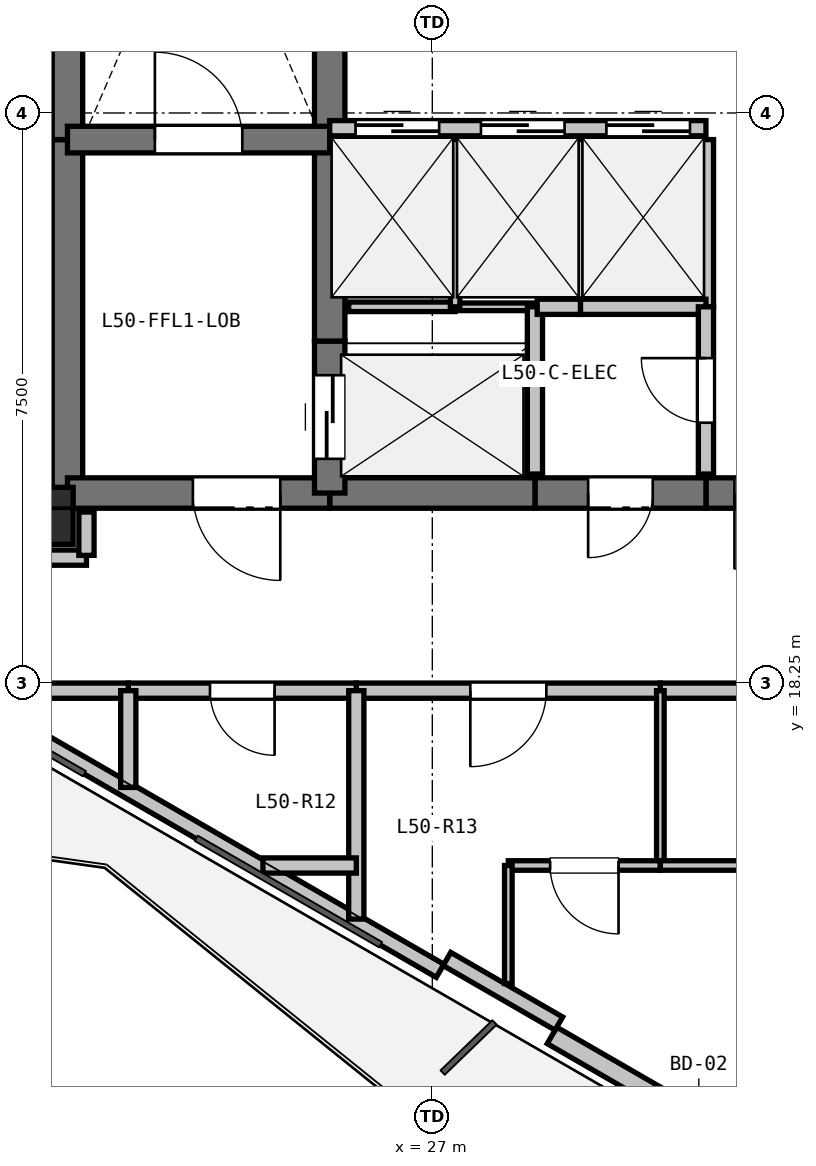
"""IFC4 building model, lengths in metres.
Left out: names, types, materials, properties, quantities, classifications, styles, units other than length and angle.
Written with IfcOpenShell. Run it as: python <this file> out.ifc"""

import sys

from ifc_helpers import new_model, si_unit, direction, frame, frame_2d, origin, origin_2d, place, context, subcontext, project, spatial, rectangle, extrude, element, fill, save


model = new_model("IFC4")
c1 = context("Model", 3, precision=1e-05, world=origin(), true_north=direction((0.0, 1.0)))
c2 = subcontext(c1, "Body", "Model", "MODEL_VIEW")
j1 = project(units=[si_unit("LENGTHUNIT", "METRE"), si_unit("PLANEANGLEUNIT", "RADIAN")], contexts=[c1])
p1 = place(None, origin())
s1 = spatial("IfcSite", under=j1, at=p1, CompositionType="ELEMENT")
p2 = place(p1, origin())
s2 = spatial("IfcBuilding", under=s1, at=p2, CompositionType="ELEMENT")
p3 = place(p2, frame((0.0, 0.0, 182.1)))
s3 = spatial("IfcBuildingStorey", under=s2, at=p3, CompositionType="ELEMENT", Elevation=182.1)
p4 = place(p3, frame((21.9, 20.45, 0.0), z_axis=(0.0, 0.0, 1.0), x_axis=(1.0, 0.0, 0.0)))
e1 = element("IfcColumn", 1, at=p4, inside=s3, PredefinedType="COLUMN", context=c2, shape_type="SweptSolid", body=[
    extrude(rectangle(XDim=0.75, YDim=0.75, at=origin_2d()), origin(), (0.0, 0.0, 1.0), 3.3),
])
p5 = place(p3, frame((36.974, 8.765, 0.0), z_axis=(0.0, 0.0, 1.0), x_axis=(-0.866016233231, 0.500015883528, 0.0)))
e2 = element("IfcWall", 2, at=p5, inside=s3, PredefinedType="SOLIDWALL", context=c2, shape_type="SweptSolid", body=[
    extrude(rectangle(XDim=9.699, YDim=0.25, at=frame_2d((4.85, 0.0))), origin(), (0.0, 0.0, 1.0), 2.69),
])
p6 = place(p5, frame((6.919, 0.0, 0.0)))
e3 = element("IfcOpeningElement", 3, at=p6, cuts=e2, PredefinedType="OPENING", context=c2, shape_type="SweptSolid", body=[
    extrude(rectangle(XDim=1.1, YDim=2.1, at=frame_2d((0.55, 1.05))), frame((0.0, 0.135, 0.0), z_axis=(0.0, -1.0, 0.0), x_axis=(1.0, 0.0, 0.0)), (0.0, 0.0, 1.0), 0.27),
])
p7 = place(p3, frame((27.102, 14.464, 0.0), z_axis=(0.0, 0.0, 1.0), x_axis=(-0.866020680503, 0.500008180874, 0.0)))
e4 = element("IfcWall", 4, at=p7, inside=s3, PredefinedType="PARAPET", context=c2, shape_type="SweptSolid", body=[
    extrude(rectangle(XDim=8.999, YDim=0.2, at=frame_2d((4.5, 0.0))), origin(), (0.0, 0.0, 1.0), 0.2),
])
p8 = place(p3, frame((28.665, 13.77, 0.0), z_axis=(0.0, 0.0, 1.0), x_axis=(-0.866025371046, 0.500000056704, 0.0)))
e5 = element("IfcWall", 5, at=p8, inside=s3, PredefinedType="PARAPET", context=c2, shape_type="SweptSolid", body=[
    extrude(rectangle(XDim=1.7, YDim=0.2, at=frame_2d((0.85, 0.0))), origin(), (0.0, 0.0, 1.0), 2.69),
])
p9 = place(p3, frame((22.2, 20.75, 0.0), z_axis=(0.0, 0.0, 1.0), x_axis=(0.0, 1.0, 0.0)))
e6 = element("IfcWall", 6, at=p9, inside=s3, PredefinedType="SHEAR", context=c2, shape_type="SweptSolid", body=[
    extrude(rectangle(XDim=4.65, YDim=0.4, at=frame_2d((2.325, 0.0))), origin(), (0.0, 0.0, 1.0), 3.07),
])
p10 = place(p3, frame((22.2, 25.4, 0.0), z_axis=(0.0, 0.0, 1.0), x_axis=(0.0, 1.0, 0.0)))
e7 = element("IfcWall", 7, at=p10, inside=s3, PredefinedType="SHEAR", context=c2, shape_type="SweptSolid", body=[
    extrude(rectangle(XDim=7.35, YDim=0.4, at=frame_2d((3.675, 0.0))), origin(), (0.0, 0.0, 1.0), 3.07),
])
p11 = place(p3, frame((32.35, 20.75, 0.0), z_axis=(0.0, 0.0, 1.0), x_axis=(-1.0, 0.0, 0.0)))
e8 = element("IfcWall", 8, at=p11, inside=s3, PredefinedType="SHEAR", context=c2, shape_type="SweptSolid", body=[
    extrude(rectangle(XDim=1.75, YDim=0.4, at=frame_2d((0.875, 0.0))), origin(), (0.0, 0.0, 1.0), 3.07),
])
p12 = place(p11, frame((0.375, 0.0, 0.0)))
e9 = element("IfcOpeningElement", 9, at=p12, cuts=e8, PredefinedType="OPENING", context=c2, shape_type="SweptSolid", body=[
    extrude(rectangle(XDim=1.0, YDim=2.15, at=frame_2d((0.5, 1.075))), frame((0.0, 0.21, 0.0), z_axis=(0.0, -1.0, 0.0), x_axis=(1.0, 0.0, 0.0)), (0.0, 0.0, 1.0), 0.42),
])
p13 = place(p3, frame((30.6, 20.75, 0.0), z_axis=(0.0, 0.0, 1.0), x_axis=(-1.0, 0.0, 0.0)))
e10 = element("IfcWall", 10, at=p13, inside=s3, PredefinedType="SHEAR", context=c2, shape_type="SweptSolid", body=[
    extrude(rectangle(XDim=2.25, YDim=0.4, at=frame_2d((1.125, 0.0))), origin(), (0.0, 0.0, 1.0), 3.07),
])
p14 = place(p13, frame((0.7, 0.0, 0.0)))
e11 = element("IfcOpeningElement", 11, at=p14, cuts=e10, PredefinedType="OPENING", context=c2, shape_type="SweptSolid", body=[
    extrude(rectangle(XDim=0.85, YDim=2.1, at=frame_2d((0.425, 1.05))), frame((0.0, 0.21, 0.0), z_axis=(0.0, -1.0, 0.0), x_axis=(1.0, 0.0, 0.0)), (0.0, 0.0, 1.0), 0.42),
])
p15 = place(p3, frame((28.35, 20.75, 0.0), z_axis=(0.0, 0.0, 1.0), x_axis=(-1.0, 0.0, 0.0)))
e12 = element("IfcWall", 12, at=p15, inside=s3, PredefinedType="SHEAR", context=c2, shape_type="SweptSolid", body=[
    extrude(rectangle(XDim=2.7, YDim=0.4, at=frame_2d((1.35, 0.0))), origin(), (0.0, 0.0, 1.0), 3.07),
])
p16 = place(p3, frame((25.65, 20.75, 0.0), z_axis=(0.0, 0.0, 1.0), x_axis=(-1.0, 0.0, 0.0)))
e13 = element("IfcWall", 13, at=p16, inside=s3, PredefinedType="SHEAR", context=c2, shape_type="SweptSolid", body=[
    extrude(rectangle(XDim=3.45, YDim=0.4, at=frame_2d((1.725, 0.0))), origin(), (0.0, 0.0, 1.0), 3.07),
])
p17 = place(p16, frame((0.65, 0.0, 0.0)))
e14 = element("IfcOpeningElement", 14, at=p17, cuts=e13, PredefinedType="OPENING", context=c2, shape_type="SweptSolid", body=[
    extrude(rectangle(XDim=1.15, YDim=2.15, at=frame_2d((0.575, 1.075))), frame((0.0, 0.21, 0.0), z_axis=(0.0, -1.0, 0.0), x_axis=(1.0, 0.0, 0.0)), (0.0, 0.0, 1.0), 0.42),
])
p18 = place(p3, frame((25.65, 20.75, 0.0), z_axis=(0.0, 0.0, 1.0), x_axis=(0.0, 1.0, 0.0)))
e15 = element("IfcWall", 15, at=p18, inside=s3, PredefinedType="SHEAR", context=c2, shape_type="SweptSolid", body=[
    extrude(rectangle(XDim=2.0, YDim=0.4, at=frame_2d((1.0, 0.0))), origin(), (0.0, 0.0, 1.0), 3.07),
])
p19 = place(p18, frame((0.45, 0.0, 0.0)))
e16 = element("IfcOpeningElement", 16, at=p19, cuts=e15, PredefinedType="OPENING", context=c2, shape_type="SweptSolid", body=[
    extrude(rectangle(XDim=1.1, YDim=2.15, at=frame_2d((0.55, 1.075))), frame((0.0, 0.21, 0.0), z_axis=(0.0, -1.0, 0.0), x_axis=(1.0, 0.0, 0.0)), (0.0, 0.0, 1.0), 0.42),
])
p20 = place(p3, frame((25.65, 22.75, 0.0), z_axis=(0.0, 0.0, 1.0), x_axis=(0.0, 1.0, 0.0)))
e17 = element("IfcWall", 17, at=p20, inside=s3, PredefinedType="SHEAR", context=c2, shape_type="SweptSolid", body=[
    extrude(rectangle(XDim=2.8, YDim=0.4, at=frame_2d((1.4, 0.0))), origin(), (0.0, 0.0, 1.0), 3.07),
])
p21 = place(p3, frame((25.65, 25.55, 0.0), z_axis=(0.0, 0.0, 1.0), x_axis=(0.0, 1.0, 0.0)))
e18 = element("IfcWall", 18, at=p21, inside=s3, PredefinedType="SHEAR", context=c2, shape_type="SweptSolid", body=[
    extrude(rectangle(XDim=2.4, YDim=0.4, at=frame_2d((1.2, 0.0))), origin(), (0.0, 0.0, 1.0), 3.07),
])
p22 = place(p3, frame((22.2, 25.4, 0.0), z_axis=(0.0, 0.0, 1.0), x_axis=(1.0, 0.0, 0.0)))
e19 = element("IfcWall", 19, at=p22, inside=s3, PredefinedType="SHEAR", context=c2, shape_type="SweptSolid", body=[
    extrude(rectangle(XDim=3.45, YDim=0.35, at=frame_2d((1.725, 0.0))), origin(), (0.0, 0.0, 1.0), 3.07),
])
p23 = place(p22, frame((1.15, 0.0, 0.0)))
e20 = element("IfcOpeningElement", 20, at=p23, cuts=e19, PredefinedType="OPENING", context=c2, shape_type="SweptSolid", body=[
    extrude(rectangle(XDim=1.15, YDim=2.15, at=frame_2d((0.575, 1.075))), frame((0.0, 0.185, 0.0), z_axis=(0.0, -1.0, 0.0), x_axis=(1.0, 0.0, 0.0)), (0.0, 0.0, 1.0), 0.37),
])
p24 = place(p3, frame((25.65, 25.55, 0.0), z_axis=(0.0, 0.0, 1.0), x_axis=(1.0, 0.0, 0.0)))
e21 = element("IfcWall", 21, at=p24, inside=s3, PredefinedType="PARTITIONING", context=c2, shape_type="SweptSolid", body=[
    extrude(rectangle(XDim=4.95, YDim=0.2, at=frame_2d((2.475, 0.0))), origin(), (0.0, 0.0, 1.0), 3.07),
])
p25 = place(p24, frame((0.34, 0.0, 0.0)))
e22 = element("IfcOpeningElement", 22, at=p25, cuts=e21, PredefinedType="OPENING", context=c2, shape_type="SweptSolid", body=[
    extrude(rectangle(XDim=1.1, YDim=2.15, at=frame_2d((0.55, 1.075))), frame((0.0, 0.11, 0.0), z_axis=(0.0, -1.0, 0.0), x_axis=(1.0, 0.0, 0.0)), (0.0, 0.0, 1.0), 0.22),
])
p26 = place(p24, frame((1.99, 0.0, 0.0)))
e23 = element("IfcOpeningElement", 23, at=p26, cuts=e21, PredefinedType="OPENING", context=c2, shape_type="SweptSolid", body=[
    extrude(rectangle(XDim=1.1, YDim=2.15, at=frame_2d((0.55, 1.075))), frame((0.0, 0.11, 0.0), z_axis=(0.0, -1.0, 0.0), x_axis=(1.0, 0.0, 0.0)), (0.0, 0.0, 1.0), 0.22),
])
p27 = place(p24, frame((3.64, 0.0, 0.0)))
e24 = element("IfcOpeningElement", 24, at=p27, cuts=e21, PredefinedType="OPENING", context=c2, shape_type="SweptSolid", body=[
    extrude(rectangle(XDim=1.1, YDim=2.15, at=frame_2d((0.55, 1.075))), frame((0.0, 0.11, 0.0), z_axis=(0.0, -1.0, 0.0), x_axis=(1.0, 0.0, 0.0)), (0.0, 0.0, 1.0), 0.22),
])
p28 = place(p3, frame((25.9, 23.2, 0.0), z_axis=(0.0, 0.0, 1.0), x_axis=(1.0, 0.0, 0.0)))
e25 = element("IfcWall", 25, at=p28, inside=s3, PredefinedType="PARTITIONING", context=c2, shape_type="SweptSolid", body=[
    extrude(rectangle(XDim=1.4, YDim=0.125, at=frame_2d((0.7, 0.0))), origin(), (0.0, 0.0, 1.0), 3.07),
])
p29 = place(p3, frame((27.3, 23.2, 0.0), z_axis=(0.0, 0.0, 1.0), x_axis=(1.0, 0.0, 0.0)))
e26 = element("IfcWall", 26, at=p29, inside=s3, PredefinedType="PARTITIONING", context=c2, shape_type="SweptSolid", body=[
    extrude(rectangle(XDim=1.05, YDim=0.1, at=frame_2d((0.525, 0.0))), origin(), (0.0, 0.0, 1.0), 3.07),
])
p30 = place(p3, frame((28.35, 23.2, 0.0), z_axis=(0.0, 0.0, 1.0), x_axis=(0.0, -1.0, 0.0)))
e27 = element("IfcWall", 27, at=p30, inside=s3, PredefinedType="PARTITIONING", context=c2, shape_type="SweptSolid", body=[
    extrude(rectangle(XDim=2.2, YDim=0.2, at=frame_2d((1.1, 0.0))), origin(), (0.0, 0.0, 1.0), 3.07),
])
p31 = place(p3, frame((27.3, 25.4, 0.0), z_axis=(0.0, 0.0, 1.0), x_axis=(0.0, -1.0, 0.0)))
e28 = element("IfcWall", 28, at=p31, inside=s3, PredefinedType="PARTITIONING", context=c2, shape_type="SweptSolid", body=[
    extrude(rectangle(XDim=2.2, YDim=0.125, at=frame_2d((1.1, 0.0))), origin(), (0.0, 0.0, 1.0), 3.07),
])
p32 = place(p3, frame((28.95, 25.4, 0.0), z_axis=(0.0, 0.0, 1.0), x_axis=(0.0, -1.0, 0.0)))
e29 = element("IfcWall", 29, at=p32, inside=s3, PredefinedType="PARTITIONING", context=c2, shape_type="SweptSolid", body=[
    extrude(rectangle(XDim=2.2, YDim=0.1, at=frame_2d((1.1, 0.0))), origin(), (0.0, 0.0, 1.0), 3.07),
])
p33 = place(p3, frame((28.95, 23.2, 0.0), z_axis=(0.0, 0.0, 1.0), x_axis=(-1.0, 0.0, 0.0)))
e30 = element("IfcWall", 30, at=p33, inside=s3, PredefinedType="PARTITIONING", context=c2, shape_type="SweptSolid", body=[
    extrude(rectangle(XDim=0.57, YDim=0.2, at=frame_2d((0.285, 0.0))), origin(), (0.0, 0.0, 1.0), 3.07),
])
p34 = place(p3, frame((30.6, 25.4, 0.0), z_axis=(0.0, 0.0, 1.0), x_axis=(0.0, -1.0, 0.0)))
e31 = element("IfcWall", 31, at=p34, inside=s3, PredefinedType="PARTITIONING", context=c2, shape_type="SweptSolid", body=[
    extrude(rectangle(XDim=2.2, YDim=0.2, at=frame_2d((1.1, 0.0))), origin(), (0.0, 0.0, 1.0), 3.07),
])
p35 = place(p3, frame((30.6, 23.2, 0.0), z_axis=(0.0, 0.0, 1.0), x_axis=(-1.0, 0.0, 0.0)))
e32 = element("IfcWall", 32, at=p35, inside=s3, PredefinedType="PARTITIONING", context=c2, shape_type="SweptSolid", body=[
    extrude(rectangle(XDim=1.65, YDim=0.2, at=frame_2d((0.825, 0.0))), origin(), (0.0, 0.0, 1.0), 3.07),
])
p36 = place(p3, frame((30.6, 21.0, 0.0), z_axis=(0.0, 0.0, 1.0), x_axis=(0.0, 1.0, 0.0)))
e33 = element("IfcWall", 33, at=p36, inside=s3, PredefinedType="PARTITIONING", context=c2, shape_type="SweptSolid", body=[
    extrude(rectangle(XDim=2.2, YDim=0.2, at=frame_2d((1.1, 0.0))), origin(), (0.0, 0.0, 1.0), 3.07),
])
p37 = place(p36, frame((0.675, 0.0, 0.0)))
e34 = element("IfcOpeningElement", 34, at=p37, cuts=e33, PredefinedType="OPENING", context=c2, shape_type="SweptSolid", body=[
    extrude(rectangle(XDim=0.85, YDim=2.1, at=frame_2d((0.425, 1.05))), frame((0.0, 0.11, 0.0), z_axis=(0.0, -1.0, 0.0), x_axis=(1.0, 0.0, 0.0)), (0.0, 0.0, 1.0), 0.22),
])
p38 = place(p3, frame((21.35, 19.9, 0.0), z_axis=(0.0, 0.0, 1.0), x_axis=(1.0, 0.0, 0.0)))
e35 = element("IfcWall", 35, at=p38, inside=s3, PredefinedType="PARTITIONING", context=c2, shape_type="SweptSolid", body=[
    extrude(rectangle(XDim=1.1, YDim=0.2, at=frame_2d((0.55, 0.0))), origin(), (0.0, 0.0, 1.0), 2.518),
])
p39 = place(p3, frame((22.45, 19.93, 0.0), z_axis=(0.0, 0.0, 1.0), x_axis=(0.0, 1.0, 0.0)))
e36 = element("IfcWall", 36, at=p39, inside=s3, PredefinedType="PARTITIONING", context=c2, shape_type="SweptSolid", body=[
    extrude(rectangle(XDim=0.57, YDim=0.2, at=frame_2d((0.285, 0.0))), origin(), (0.0, 0.0, 1.0), 2.518),
])
p40 = place(p3, frame((34.0, 18.15, 0.0), z_axis=(0.0, 0.0, 1.0), x_axis=(-1.0, 0.0, 0.0)))
e37 = element("IfcWall", 37, at=p40, inside=s3, PredefinedType="PARTITIONING", context=c2, shape_type="SweptSolid", body=[
    extrude(rectangle(XDim=4.0, YDim=0.2, at=frame_2d((2.0, 0.0))), origin(), (0.0, 0.0, 1.0), 3.07),
])
p41 = place(p3, frame((30.0, 18.15, 0.0), z_axis=(0.0, 0.0, 1.0), x_axis=(-1.0, 0.0, 0.0)))
e38 = element("IfcWall", 38, at=p41, inside=s3, PredefinedType="PARTITIONING", context=c2, shape_type="SweptSolid", body=[
    extrude(rectangle(XDim=4.0, YDim=0.2, at=frame_2d((2.0, 0.0))), origin(), (0.0, 0.0, 1.0), 3.07),
])
p42 = place(p41, frame((1.5, 0.0, 0.0)))
e39 = element("IfcOpeningElement", 39, at=p42, cuts=e38, PredefinedType="OPENING", context=c2, shape_type="SweptSolid", body=[
    extrude(rectangle(XDim=1.0, YDim=2.15, at=frame_2d((0.5, 1.075))), frame((0.0, 0.11, 0.0), z_axis=(0.0, -1.0, 0.0), x_axis=(1.0, 0.0, 0.0)), (0.0, 0.0, 1.0), 0.22),
])
p43 = place(p3, frame((26.0, 18.15, 0.0), z_axis=(0.0, 0.0, 1.0), x_axis=(-1.0, 0.0, 0.0)))
e40 = element("IfcWall", 40, at=p43, inside=s3, PredefinedType="PARTITIONING", context=c2, shape_type="SweptSolid", body=[
    extrude(rectangle(XDim=3.0, YDim=0.2, at=frame_2d((1.5, 0.0))), origin(), (0.0, 0.0, 1.0), 2.518),
])
p44 = place(p43, frame((1.075, 0.0, 0.0)))
e41 = element("IfcOpeningElement", 41, at=p44, cuts=e40, PredefinedType="OPENING", context=c2, shape_type="SweptSolid", body=[
    extrude(rectangle(XDim=0.85, YDim=2.1, at=frame_2d((0.425, 1.05))), frame((0.0, 0.11, 0.0), z_axis=(0.0, -1.0, 0.0), x_axis=(1.0, 0.0, 0.0)), (0.0, 0.0, 1.0), 0.22),
])
p45 = place(p3, frame((23.0, 18.15, 0.0), z_axis=(0.0, 0.0, 1.0), x_axis=(-1.0, 0.0, 0.0)))
e42 = element("IfcWall", 42, at=p45, inside=s3, PredefinedType="PARTITIONING", context=c2, shape_type="SweptSolid", body=[
    extrude(rectangle(XDim=2.212, YDim=0.2, at=frame_2d((1.106, 0.0))), origin(), (0.0, 0.0, 1.0), 2.365),
])
p46 = place(p3, frame((26.0, 18.15, 0.0), z_axis=(0.0, 0.0, 1.0), x_axis=(0.0, -1.0, 0.0)))
e43 = element("IfcWall", 43, at=p46, inside=s3, PredefinedType="PARTITIONING", context=c2, shape_type="SweptSolid", body=[
    extrude(rectangle(XDim=3.005, YDim=0.2, at=frame_2d((1.502, 0.0))), origin(), (0.0, 0.0, 1.0), 2.365),
])
p47 = place(p3, frame((26.0, 15.85, 0.0), z_axis=(0.0, 0.0, 1.0), x_axis=(-1.0, 0.0, 0.0)))
e44 = element("IfcWall", 44, at=p47, inside=s3, PredefinedType="PARTITIONING", context=c2, shape_type="SweptSolid", body=[
    extrude(rectangle(XDim=1.229, YDim=0.2, at=frame_2d((0.614, 0.0))), origin(), (0.0, 0.0, 1.0), 2.365),
])
p48 = place(p3, frame((23.0, 16.877, 0.0), z_axis=(0.0, 0.0, 1.0), x_axis=(0.0, 1.0, 0.0)))
e45 = element("IfcWall", 45, at=p48, inside=s3, PredefinedType="PARTITIONING", context=c2, shape_type="SweptSolid", body=[
    extrude(rectangle(XDim=1.273, YDim=0.2, at=frame_2d((0.636, 0.0))), origin(), (0.0, 0.0, 1.0), 2.365),
])
p49 = place(p3, frame((30.0, 18.15, 0.0), z_axis=(0.0, 0.0, 1.0), x_axis=(0.0, -1.0, 0.0)))
e46 = element("IfcWall", 46, at=p49, inside=s3, PredefinedType="PARTITIONING", context=c2, shape_type="SweptSolid", body=[
    extrude(rectangle(XDim=2.3, YDim=0.1, at=frame_2d((1.15, 0.0))), origin(), (0.0, 0.0, 1.0), 3.07),
])
p50 = place(p3, frame((30.0, 15.85, 0.0), z_axis=(0.0, 0.0, 1.0), x_axis=(-1.0, 0.0, 0.0)))
e47 = element("IfcWall", 47, at=p50, inside=s3, PredefinedType="PARTITIONING", context=c2, shape_type="SweptSolid", body=[
    extrude(rectangle(XDim=2.0, YDim=0.125, at=frame_2d((1.0, 0.0))), origin(), (0.0, 0.0, 1.0), 3.07),
])
p51 = place(p50, frame((0.55, 0.0, 0.0)))
e48 = element("IfcOpeningElement", 48, at=p51, cuts=e47, PredefinedType="OPENING", context=c2, shape_type="SweptSolid", body=[
    extrude(rectangle(XDim=0.9, YDim=2.1, at=frame_2d((0.45, 1.05))), frame((0.0, 0.073, 0.0), z_axis=(0.0, -1.0, 0.0), x_axis=(1.0, 0.0, 0.0)), (0.0, 0.0, 1.0), 0.145),
])
p52 = place(p3, frame((28.0, 15.85, 0.0), z_axis=(0.0, 0.0, 1.0), x_axis=(0.0, -1.0, 0.0)))
e49 = element("IfcWall", 49, at=p52, inside=s3, PredefinedType="PARTITIONING", context=c2, shape_type="SweptSolid", body=[
    extrude(rectangle(XDim=1.553, YDim=0.1, at=frame_2d((0.776, 0.0))), origin(), (0.0, 0.0, 1.0), 2.365),
])
p53 = place(p3, frame((30.0, 15.85, 0.0), z_axis=(0.0, 0.0, 1.0), x_axis=(1.0, 0.0, 0.0)))
e50 = element("IfcWall", 50, at=p53, inside=s3, PredefinedType="PARTITIONING", context=c2, shape_type="SweptSolid", body=[
    extrude(rectangle(XDim=4.0, YDim=0.125, at=frame_2d((2.0, 0.0))), origin(), (0.0, 0.0, 1.0), 3.07),
])
p54 = place(p25, origin())
e51 = element("IfcDoor", 51, at=p54, inside=s3, OperationType="SLIDING_TO_LEFT", PredefinedType="DOOR", context=c2, shape_type="SweptSolid", body=[
    extrude(rectangle(XDim=1.1, YDim=2.15, at=frame_2d((0.55, 1.075))), frame((0.0, 0.025, 0.0), z_axis=(0.0, -1.0, 0.0), x_axis=(1.0, 0.0, 0.0)), (0.0, 0.0, 1.0), 0.05),
])
fill(e22, e51)
p55 = place(p26, origin())
e52 = element("IfcDoor", 52, at=p55, inside=s3, OperationType="SLIDING_TO_LEFT", PredefinedType="DOOR", context=c2, shape_type="SweptSolid", body=[
    extrude(rectangle(XDim=1.1, YDim=2.15, at=frame_2d((0.55, 1.075))), frame((0.0, 0.025, 0.0), z_axis=(0.0, -1.0, 0.0), x_axis=(1.0, 0.0, 0.0)), (0.0, 0.0, 1.0), 0.05),
])
fill(e23, e52)
p56 = place(p27, origin())
e53 = element("IfcDoor", 53, at=p56, inside=s3, OperationType="SLIDING_TO_LEFT", PredefinedType="DOOR", context=c2, shape_type="SweptSolid", body=[
    extrude(rectangle(XDim=1.1, YDim=2.15, at=frame_2d((0.55, 1.075))), frame((0.0, 0.025, 0.0), z_axis=(0.0, -1.0, 0.0), x_axis=(1.0, 0.0, 0.0)), (0.0, 0.0, 1.0), 0.05),
])
fill(e24, e53)
p57 = place(p12, origin())
e54 = element("IfcDoor", 54, at=p57, inside=s3, OperationType="SINGLE_SWING_RIGHT", PredefinedType="DOOR", context=c2, shape_type="SweptSolid", body=[
    extrude(rectangle(XDim=1.0, YDim=2.15, at=frame_2d((0.5, 1.075))), frame((0.0, 0.025, 0.0), z_axis=(0.0, -1.0, 0.0), x_axis=(1.0, 0.0, 0.0)), (0.0, 0.0, 1.0), 0.05),
])
fill(e9, e54)
p58 = place(p19, origin())
e55 = element("IfcDoor", 55, at=p58, inside=s3, OperationType="SLIDING_TO_LEFT", PredefinedType="DOOR", context=c2, shape_type="SweptSolid", body=[
    extrude(rectangle(XDim=1.1, YDim=2.15, at=frame_2d((0.55, 1.075))), frame((0.0, 0.025, 0.0), z_axis=(0.0, -1.0, 0.0), x_axis=(1.0, 0.0, 0.0)), (0.0, 0.0, 1.0), 0.05),
])
fill(e16, e55)
p59 = place(p23, origin())
e56 = element("IfcDoor", 56, at=p59, inside=s3, OperationType="SINGLE_SWING_LEFT", PredefinedType="DOOR", context=c2, shape_type="SweptSolid", body=[
    extrude(rectangle(XDim=1.15, YDim=2.15, at=frame_2d((0.575, 1.075))), frame((0.0, 0.025, 0.0), z_axis=(0.0, -1.0, 0.0), x_axis=(1.0, 0.0, 0.0)), (0.0, 0.0, 1.0), 0.05),
])
fill(e20, e56)
p60 = place(p17, origin())
e57 = element("IfcDoor", 57, at=p60, inside=s3, OperationType="SINGLE_SWING_LEFT", PredefinedType="DOOR", context=c2, shape_type="SweptSolid", body=[
    extrude(rectangle(XDim=1.15, YDim=2.15, at=frame_2d((0.575, 1.075))), frame((0.0, 0.025, 0.0), z_axis=(0.0, -1.0, 0.0), x_axis=(1.0, 0.0, 0.0)), (0.0, 0.0, 1.0), 0.05),
])
fill(e14, e57)
p61 = place(p37, origin())
e58 = element("IfcDoor", 58, at=p61, inside=s3, OperationType="SINGLE_SWING_RIGHT", PredefinedType="DOOR", context=c2, shape_type="SweptSolid", body=[
    extrude(rectangle(XDim=0.85, YDim=2.1, at=frame_2d((0.425, 1.05))), frame((0.0, 0.025, 0.0), z_axis=(0.0, -1.0, 0.0), x_axis=(1.0, 0.0, 0.0)), (0.0, 0.0, 1.0), 0.05),
])
fill(e34, e58)
p62 = place(p14, origin())
e59 = element("IfcDoor", 59, at=p62, inside=s3, OperationType="SINGLE_SWING_RIGHT", PredefinedType="DOOR", context=c2, shape_type="SweptSolid", body=[
    extrude(rectangle(XDim=0.85, YDim=2.1, at=frame_2d((0.425, 1.05))), frame((0.0, 0.025, 0.0), z_axis=(0.0, -1.0, 0.0), x_axis=(1.0, 0.0, 0.0)), (0.0, 0.0, 1.0), 0.05),
])
fill(e11, e59)
p63 = place(p44, origin())
e60 = element("IfcDoor", 60, at=p63, inside=s3, OperationType="SINGLE_SWING_LEFT", PredefinedType="DOOR", context=c2, shape_type="SweptSolid", body=[
    extrude(rectangle(XDim=0.85, YDim=2.1, at=frame_2d((0.425, 1.05))), frame((0.0, 0.025, 0.0), z_axis=(0.0, -1.0, 0.0), x_axis=(1.0, 0.0, 0.0)), (0.0, 0.0, 1.0), 0.05),
])
fill(e41, e60)
p64 = place(p42, origin())
e61 = element("IfcDoor", 61, at=p64, inside=s3, OperationType="SINGLE_SWING_RIGHT", PredefinedType="DOOR", context=c2, shape_type="SweptSolid", body=[
    extrude(rectangle(XDim=1.0, YDim=2.15, at=frame_2d((0.5, 1.075))), frame((0.0, 0.025, 0.0), z_axis=(0.0, -1.0, 0.0), x_axis=(1.0, 0.0, 0.0)), (0.0, 0.0, 1.0), 0.05),
])
fill(e39, e61)
p65 = place(p51, origin())
e62 = element("IfcDoor", 62, at=p65, inside=s3, OperationType="SINGLE_SWING_LEFT", PredefinedType="DOOR", context=c2, shape_type="SweptSolid", body=[
    extrude(rectangle(XDim=0.9, YDim=2.1, at=frame_2d((0.45, 1.05))), frame((0.0, 0.025, 0.0), z_axis=(0.0, -1.0, 0.0), x_axis=(1.0, 0.0, 0.0)), (0.0, 0.0, 1.0), 0.05),
])
fill(e48, e62)
save(model, sys.argv[1])
